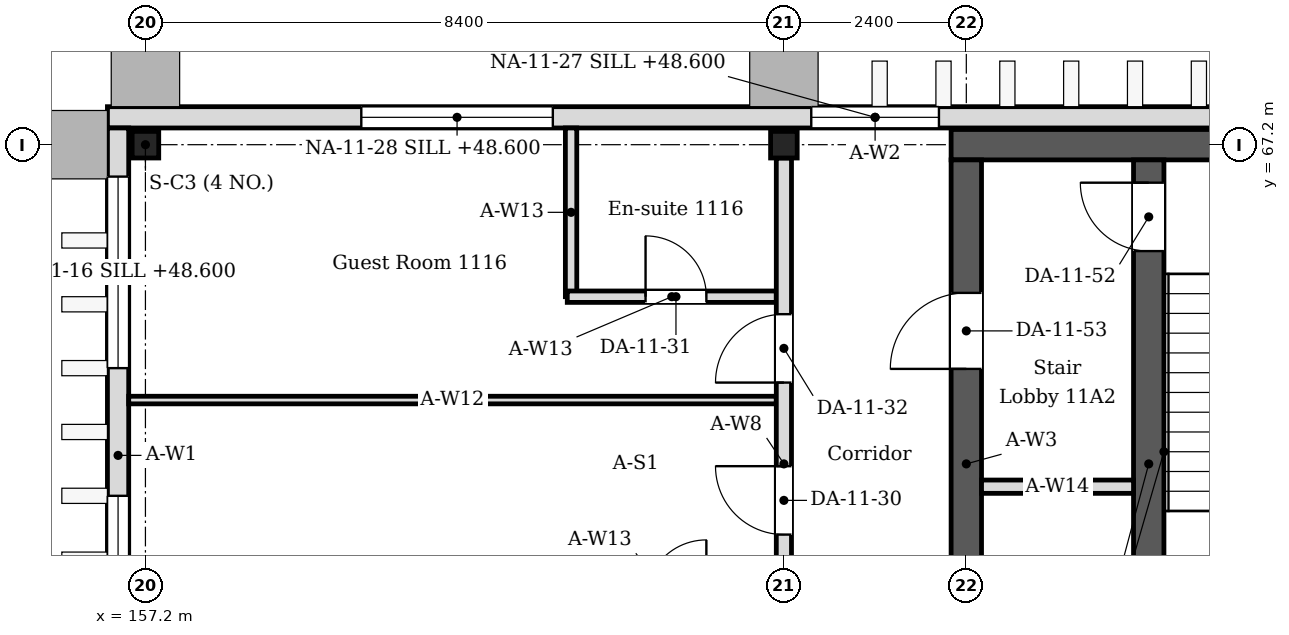
"""IFC4 building model, lengths in metres.
Left out: names, types, materials, properties, quantities, classifications, styles, units other than length and angle.
Written with IfcOpenShell. Run it as: python <this file> out.ifc"""

import sys

from ifc_helpers import new_model, si_unit, direction, frame, frame_2d, origin, origin_2d, place, context, subcontext, project, spatial, rectangle, i_section, extrude, element, fill, save


model = new_model("IFC4")
c1 = context("Model", 3, precision=1e-05, world=origin(), true_north=direction((0.0, 1.0)))
c2 = subcontext(c1, "Body", "Model", "MODEL_VIEW")
j1 = project(units=[si_unit("LENGTHUNIT", "METRE"), si_unit("PLANEANGLEUNIT", "RADIAN")], contexts=[c1])
p1 = place(None, origin())
s1 = spatial("IfcSite", under=j1, at=p1, CompositionType="ELEMENT")
p2 = place(p1, origin())
s2 = spatial("IfcBuilding", under=s1, at=p2, CompositionType="ELEMENT")
p3 = place(p2, frame((0.0, 0.0, 48.0)))
s3 = spatial("IfcBuildingStorey", under=s2, at=p3, CompositionType="ELEMENT", Elevation=48.0)
for number, where, z_axis, x_axis in (
    (1, (157.2, 67.2, 0.0), (0.0, 0.0, 1.0), (1.0, 0.0, 0.0)),
    (2, (165.6, 67.2, 0.0), (0.0, 0.0, 1.0), (1.0, 0.0, 0.0)),
):
    element("IfcColumn", number, at=place(p3, frame(where, z_axis=z_axis, x_axis=x_axis)), inside=s3, PredefinedType="COLUMN", context=c2, shape_type="SweptSolid", body=[
        extrude(i_section(OverallWidth=0.35, OverallDepth=0.35, WebThickness=0.012, FlangeThickness=0.019, FilletRadius=0.013, at=origin_2d()), origin(), (0.0, 0.0, 1.0), 4.2),
    ])
p4 = place(p3, frame((167.8, 67.2, 0.0), z_axis=(0.0, 0.0, 1.0), x_axis=(1.0, 0.0, 0.0)))
e3 = element("IfcWall", 3, at=p4, inside=s3, PredefinedType="SOLIDWALL", context=c2, shape_type="SweptSolid", body=[
    extrude(rectangle(XDim=8.8, YDim=0.4, at=frame_2d((4.4, 0.0))), origin(), (0.0, 0.0, 1.0), 4.05),
])
p5 = place(p3, frame((168.0, 59.0, 0.0), z_axis=(0.0, 0.0, 1.0), x_axis=(0.0, 1.0, 0.0)))
e4 = element("IfcWall", 4, at=p5, inside=s3, PredefinedType="SOLIDWALL", context=c2, shape_type="SweptSolid", body=[
    extrude(rectangle(XDim=8.0, YDim=0.4, at=frame_2d((4.0, 0.0))), origin(), (0.0, 0.0, 1.0), 4.05),
])
p6 = place(p5, frame((5.25, 0.0, 0.0)))
e5 = element("IfcOpeningElement", 5, at=p6, cuts=e4, PredefinedType="OPENING", context=c2, shape_type="SweptSolid", body=[
    extrude(rectangle(XDim=1.0, YDim=2.1, at=frame_2d((0.5, 1.05))), frame((0.0, 0.21, 0.0), z_axis=(0.0, -1.0, 0.0), x_axis=(1.0, 0.0, 0.0)), (0.0, 0.0, 1.0), 0.42),
])
p7 = place(p5, frame((1.275, 0.0, 0.0)))
e6 = element("IfcOpeningElement", 6, at=p7, cuts=e4, PredefinedType="OPENING", context=c2, shape_type="SweptSolid", body=[
    extrude(rectangle(XDim=1.05, YDim=2.1, at=frame_2d((0.525, 1.05))), frame((0.0, 0.21, 0.0), z_axis=(0.0, -1.0, 0.0), x_axis=(1.0, 0.0, 0.0)), (0.0, 0.0, 1.0), 0.42),
])
p8 = place(p3, frame((156.84, 41.65, 0.0), z_axis=(0.0, 0.0, 1.0), x_axis=(0.0, 1.0, 0.0)))
e7 = element("IfcWall", 7, at=p8, inside=s3, PredefinedType="SOLIDWALL", context=c2, shape_type="SweptSolid", body=[
    extrude(rectangle(XDim=25.77, YDim=0.28, at=frame_2d((12.885, 0.0))), origin(), (0.0, 0.0, 1.0), 4.05),
])
p9 = place(p8, frame((1.61, 0.0, 0.6)))
e8 = element("IfcOpeningElement", 8, at=p9, cuts=e7, PredefinedType="OPENING", context=c2, shape_type="SweptSolid", body=[
    extrude(rectangle(XDim=2.52, YDim=2.4, at=frame_2d((1.26, 1.2))), frame((0.0, 0.15, 0.0), z_axis=(0.0, -1.0, 0.0), x_axis=(1.0, 0.0, 0.0)), (0.0, 0.0, 1.0), 0.3),
])
p10 = place(p8, frame((5.81, 0.0, 0.6)))
e9 = element("IfcOpeningElement", 9, at=p10, cuts=e7, PredefinedType="OPENING", context=c2, shape_type="SweptSolid", body=[
    extrude(rectangle(XDim=2.52, YDim=2.4, at=frame_2d((1.26, 1.2))), frame((0.0, 0.15, 0.0), z_axis=(0.0, -1.0, 0.0), x_axis=(1.0, 0.0, 0.0)), (0.0, 0.0, 1.0), 0.3),
])
p11 = place(p8, frame((9.17, 0.0, 0.6)))
e10 = element("IfcOpeningElement", 10, at=p11, cuts=e7, PredefinedType="OPENING", context=c2, shape_type="SweptSolid", body=[
    extrude(rectangle(XDim=2.52, YDim=2.4, at=frame_2d((1.26, 1.2))), frame((0.0, 0.15, 0.0), z_axis=(0.0, -1.0, 0.0), x_axis=(1.0, 0.0, 0.0)), (0.0, 0.0, 1.0), 0.3),
])
p12 = place(p8, frame((13.37, 0.0, 0.6)))
e11 = element("IfcOpeningElement", 11, at=p12, cuts=e7, PredefinedType="OPENING", context=c2, shape_type="SweptSolid", body=[
    extrude(rectangle(XDim=2.52, YDim=2.4, at=frame_2d((1.26, 1.2))), frame((0.0, 0.15, 0.0), z_axis=(0.0, -1.0, 0.0), x_axis=(1.0, 0.0, 0.0)), (0.0, 0.0, 1.0), 0.3),
])
p13 = place(p8, frame((18.41, 0.0, 0.6)))
e12 = element("IfcOpeningElement", 12, at=p13, cuts=e7, PredefinedType="OPENING", context=c2, shape_type="SweptSolid", body=[
    extrude(rectangle(XDim=2.52, YDim=2.4, at=frame_2d((1.26, 1.2))), frame((0.0, 0.15, 0.0), z_axis=(0.0, -1.0, 0.0), x_axis=(1.0, 0.0, 0.0)), (0.0, 0.0, 1.0), 0.3),
])
p14 = place(p8, frame((22.61, 0.0, 0.6)))
e13 = element("IfcOpeningElement", 13, at=p14, cuts=e7, PredefinedType="OPENING", context=c2, shape_type="SweptSolid", body=[
    extrude(rectangle(XDim=2.52, YDim=2.4, at=frame_2d((1.26, 1.2))), frame((0.0, 0.15, 0.0), z_axis=(0.0, -1.0, 0.0), x_axis=(1.0, 0.0, 0.0)), (0.0, 0.0, 1.0), 0.3),
])
p15 = place(p3, frame((156.7, 67.56, 0.0), z_axis=(0.0, 0.0, 1.0), x_axis=(1.0, 0.0, 0.0)))
e14 = element("IfcWall", 14, at=p15, inside=s3, PredefinedType="SOLIDWALL", context=c2, shape_type="SweptSolid", body=[
    extrude(rectangle(XDim=20.2, YDim=0.28, at=frame_2d((10.1, 0.0))), origin(), (0.0, 0.0, 1.0), 4.05),
])
p16 = place(p15, frame((9.26, 0.0, 0.6)))
e15 = element("IfcOpeningElement", 15, at=p16, cuts=e14, PredefinedType="OPENING", context=c2, shape_type="SweptSolid", body=[
    extrude(rectangle(XDim=1.68, YDim=2.4, at=frame_2d((0.84, 1.2))), frame((0.0, 0.15, 0.0), z_axis=(0.0, -1.0, 0.0), x_axis=(1.0, 0.0, 0.0)), (0.0, 0.0, 1.0), 0.3),
])
p17 = place(p15, frame((3.34, 0.0, 0.6)))
e16 = element("IfcOpeningElement", 16, at=p17, cuts=e14, PredefinedType="OPENING", context=c2, shape_type="SweptSolid", body=[
    extrude(rectangle(XDim=2.52, YDim=2.4, at=frame_2d((1.26, 1.2))), frame((0.0, 0.15, 0.0), z_axis=(0.0, -1.0, 0.0), x_axis=(1.0, 0.0, 0.0)), (0.0, 0.0, 1.0), 0.3),
])
p18 = place(p3, frame((162.8, 65.2, 0.0), z_axis=(0.0, 0.0, 1.0), x_axis=(0.0, 1.0, 0.0)))
e17 = element("IfcWall", 17, at=p18, inside=s3, PredefinedType="PARTITIONING", context=c2, shape_type="SweptSolid", body=[
    extrude(rectangle(XDim=2.22, YDim=0.15, at=frame_2d((1.11, 0.0))), origin(), (0.0, 0.0, 1.0), 4.05),
])
p19 = place(p3, frame((162.75, 65.2, 0.0), z_axis=(0.0, 0.0, 1.0), x_axis=(1.0, 0.0, 0.0)))
e18 = element("IfcWall", 18, at=p19, inside=s3, PredefinedType="PARTITIONING", context=c2, shape_type="SweptSolid", body=[
    extrude(rectangle(XDim=2.75, YDim=0.15, at=frame_2d((1.375, 0.0))), origin(), (0.0, 0.0, 1.0), 4.05),
])
p20 = place(p19, frame((1.03, 0.0, 0.0)))
e19 = element("IfcOpeningElement", 19, at=p20, cuts=e18, PredefinedType="OPENING", context=c2, shape_type="SweptSolid", body=[
    extrude(rectangle(XDim=0.8, YDim=2.1, at=frame_2d((0.4, 1.05))), frame((0.0, 0.085, 0.0), z_axis=(0.0, -1.0, 0.0), x_axis=(1.0, 0.0, 0.0)), (0.0, 0.0, 1.0), 0.17),
])
p21 = place(p3, frame((156.98, 63.84, 0.0), z_axis=(0.0, 0.0, 1.0), x_axis=(1.0, 0.0, 0.0)))
e20 = element("IfcWall", 20, at=p21, inside=s3, PredefinedType="PARTITIONING", context=c2, shape_type="SweptSolid", body=[
    extrude(rectangle(XDim=8.52, YDim=0.1, at=frame_2d((4.26, 0.0))), origin(), (0.0, 0.0, 1.0), 3.604),
])
p22 = place(p3, frame((165.6, 58.975, 0.0), z_axis=(0.0, 0.0, 1.0), x_axis=(0.0, 1.0, 0.0)))
e21 = element("IfcWall", 21, at=p22, inside=s3, PredefinedType="PARTITIONING", context=c2, shape_type="SweptSolid", body=[
    extrude(rectangle(XDim=8.05, YDim=0.2, at=frame_2d((4.025, 0.0))), origin(), (0.0, 0.0, 1.0), 3.45),
])
p23 = place(p22, frame((3.095, 0.0, 0.0)))
e22 = element("IfcOpeningElement", 22, at=p23, cuts=e21, PredefinedType="OPENING", context=c2, shape_type="SweptSolid", body=[
    extrude(rectangle(XDim=0.9, YDim=2.1, at=frame_2d((0.45, 1.05))), frame((0.0, 0.11, 0.0), z_axis=(0.0, -1.0, 0.0), x_axis=(1.0, 0.0, 0.0)), (0.0, 0.0, 1.0), 0.22),
])
p24 = place(p22, frame((5.095, 0.0, 0.0)))
e23 = element("IfcOpeningElement", 23, at=p24, cuts=e21, PredefinedType="OPENING", context=c2, shape_type="SweptSolid", body=[
    extrude(rectangle(XDim=0.9, YDim=2.1, at=frame_2d((0.45, 1.05))), frame((0.0, 0.11, 0.0), z_axis=(0.0, -1.0, 0.0), x_axis=(1.0, 0.0, 0.0)), (0.0, 0.0, 1.0), 0.22),
])
p25 = place(p3, frame((170.4, 59.0, 0.0), z_axis=(0.0, 0.0, 1.0), x_axis=(0.0, 1.0, 0.0)))
e24 = element("IfcWall", 24, at=p25, inside=s3, PredefinedType="SOLIDWALL", context=c2, shape_type="SweptSolid", body=[
    extrude(rectangle(XDim=8.0, YDim=0.4, at=frame_2d((4.0, 0.0))), origin(), (0.0, 0.0, 1.0), 4.05),
])
p26 = place(p25, frame((6.8, 0.0, 0.0)))
e25 = element("IfcOpeningElement", 25, at=p26, cuts=e24, PredefinedType="OPENING", context=c2, shape_type="SweptSolid", body=[
    extrude(rectangle(XDim=0.9, YDim=2.1, at=frame_2d((0.45, 1.05))), frame((0.0, 0.21, 0.0), z_axis=(0.0, -1.0, 0.0), x_axis=(1.0, 0.0, 0.0)), (0.0, 0.0, 1.0), 0.42),
])
p27 = place(p3, frame((168.2, 62.7, 0.0), z_axis=(0.0, 0.0, 1.0), x_axis=(1.0, 0.0, 0.0)))
e26 = element("IfcWall", 26, at=p27, inside=s3, PredefinedType="PARTITIONING", context=c2, shape_type="SweptSolid", body=[
    extrude(rectangle(XDim=2.0, YDim=0.175, at=frame_2d((1.0, 0.0))), origin(), (0.0, 0.0, 1.0), 4.05),
])
p28 = place(p13, origin())
e27 = element("IfcWindow", 27, at=p28, inside=s3, PartitioningType="SINGLE_PANEL", PredefinedType="WINDOW", context=c2, shape_type="SweptSolid", body=[
    extrude(rectangle(XDim=2.52, YDim=2.4, at=frame_2d((1.26, 1.2))), frame((0.0, 0.03, 0.0), z_axis=(0.0, -1.0, 0.0), x_axis=(1.0, 0.0, 0.0)), (0.0, 0.0, 1.0), 0.06),
])
fill(e12, e27)
p29 = place(p14, origin())
e28 = element("IfcWindow", 28, at=p29, inside=s3, PartitioningType="SINGLE_PANEL", PredefinedType="WINDOW", context=c2, shape_type="SweptSolid", body=[
    extrude(rectangle(XDim=2.52, YDim=2.4, at=frame_2d((1.26, 1.2))), frame((0.0, 0.03, 0.0), z_axis=(0.0, -1.0, 0.0), x_axis=(1.0, 0.0, 0.0)), (0.0, 0.0, 1.0), 0.06),
])
fill(e13, e28)
p30 = place(p16, origin())
e29 = element("IfcWindow", 29, at=p30, inside=s3, PartitioningType="SINGLE_PANEL", PredefinedType="WINDOW", context=c2, shape_type="SweptSolid", body=[
    extrude(rectangle(XDim=1.68, YDim=2.4, at=frame_2d((0.84, 1.2))), frame((0.0, 0.03, 0.0), z_axis=(0.0, -1.0, 0.0), x_axis=(1.0, 0.0, 0.0)), (0.0, 0.0, 1.0), 0.06),
])
fill(e15, e29)
p31 = place(p17, origin())
e30 = element("IfcWindow", 30, at=p31, inside=s3, PartitioningType="SINGLE_PANEL", PredefinedType="WINDOW", context=c2, shape_type="SweptSolid", body=[
    extrude(rectangle(XDim=2.52, YDim=2.4, at=frame_2d((1.26, 1.2))), frame((0.0, 0.03, 0.0), z_axis=(0.0, -1.0, 0.0), x_axis=(1.0, 0.0, 0.0)), (0.0, 0.0, 1.0), 0.06),
])
fill(e16, e30)
p32 = place(p23, origin())
e31 = element("IfcDoor", 31, at=p32, inside=s3, OperationType="SINGLE_SWING_RIGHT", PredefinedType="DOOR", context=c2, shape_type="SweptSolid", body=[
    extrude(rectangle(XDim=0.9, YDim=2.1, at=frame_2d((0.45, 1.05))), frame((0.0, 0.025, 0.0), z_axis=(0.0, -1.0, 0.0), x_axis=(1.0, 0.0, 0.0)), (0.0, 0.0, 1.0), 0.05),
])
fill(e22, e31)
p33 = place(p20, origin())
e32 = element("IfcDoor", 32, at=p33, inside=s3, OperationType="SINGLE_SWING_LEFT", PredefinedType="DOOR", context=c2, shape_type="SweptSolid", body=[
    extrude(rectangle(XDim=0.8, YDim=2.1, at=frame_2d((0.4, 1.05))), frame((0.0, 0.025, 0.0), z_axis=(0.0, -1.0, 0.0), x_axis=(1.0, 0.0, 0.0)), (0.0, 0.0, 1.0), 0.05),
])
fill(e19, e32)
p34 = place(p24, origin())
e33 = element("IfcDoor", 33, at=p34, inside=s3, OperationType="SINGLE_SWING_LEFT", PredefinedType="DOOR", context=c2, shape_type="SweptSolid", body=[
    extrude(rectangle(XDim=0.9, YDim=2.1, at=frame_2d((0.45, 1.05))), frame((0.0, 0.025, 0.0), z_axis=(0.0, -1.0, 0.0), x_axis=(1.0, 0.0, 0.0)), (0.0, 0.0, 1.0), 0.05),
])
fill(e23, e33)
p35 = place(p26, origin())
e34 = element("IfcDoor", 34, at=p35, inside=s3, OperationType="SINGLE_SWING_RIGHT", PredefinedType="DOOR", context=c2, shape_type="SweptSolid", body=[
    extrude(rectangle(XDim=0.9, YDim=2.1, at=frame_2d((0.45, 1.05))), frame((0.0, 0.025, 0.0), z_axis=(0.0, -1.0, 0.0), x_axis=(1.0, 0.0, 0.0)), (0.0, 0.0, 1.0), 0.05),
])
fill(e25, e34)
p36 = place(p6, origin())
e35 = element("IfcDoor", 35, at=p36, inside=s3, OperationType="SINGLE_SWING_LEFT", PredefinedType="DOOR", context=c2, shape_type="SweptSolid", body=[
    extrude(rectangle(XDim=1.0, YDim=2.1, at=frame_2d((0.5, 1.05))), frame((0.0, 0.025, 0.0), z_axis=(0.0, -1.0, 0.0), x_axis=(1.0, 0.0, 0.0)), (0.0, 0.0, 1.0), 0.05),
])
fill(e5, e35)
save(model, sys.argv[1])
